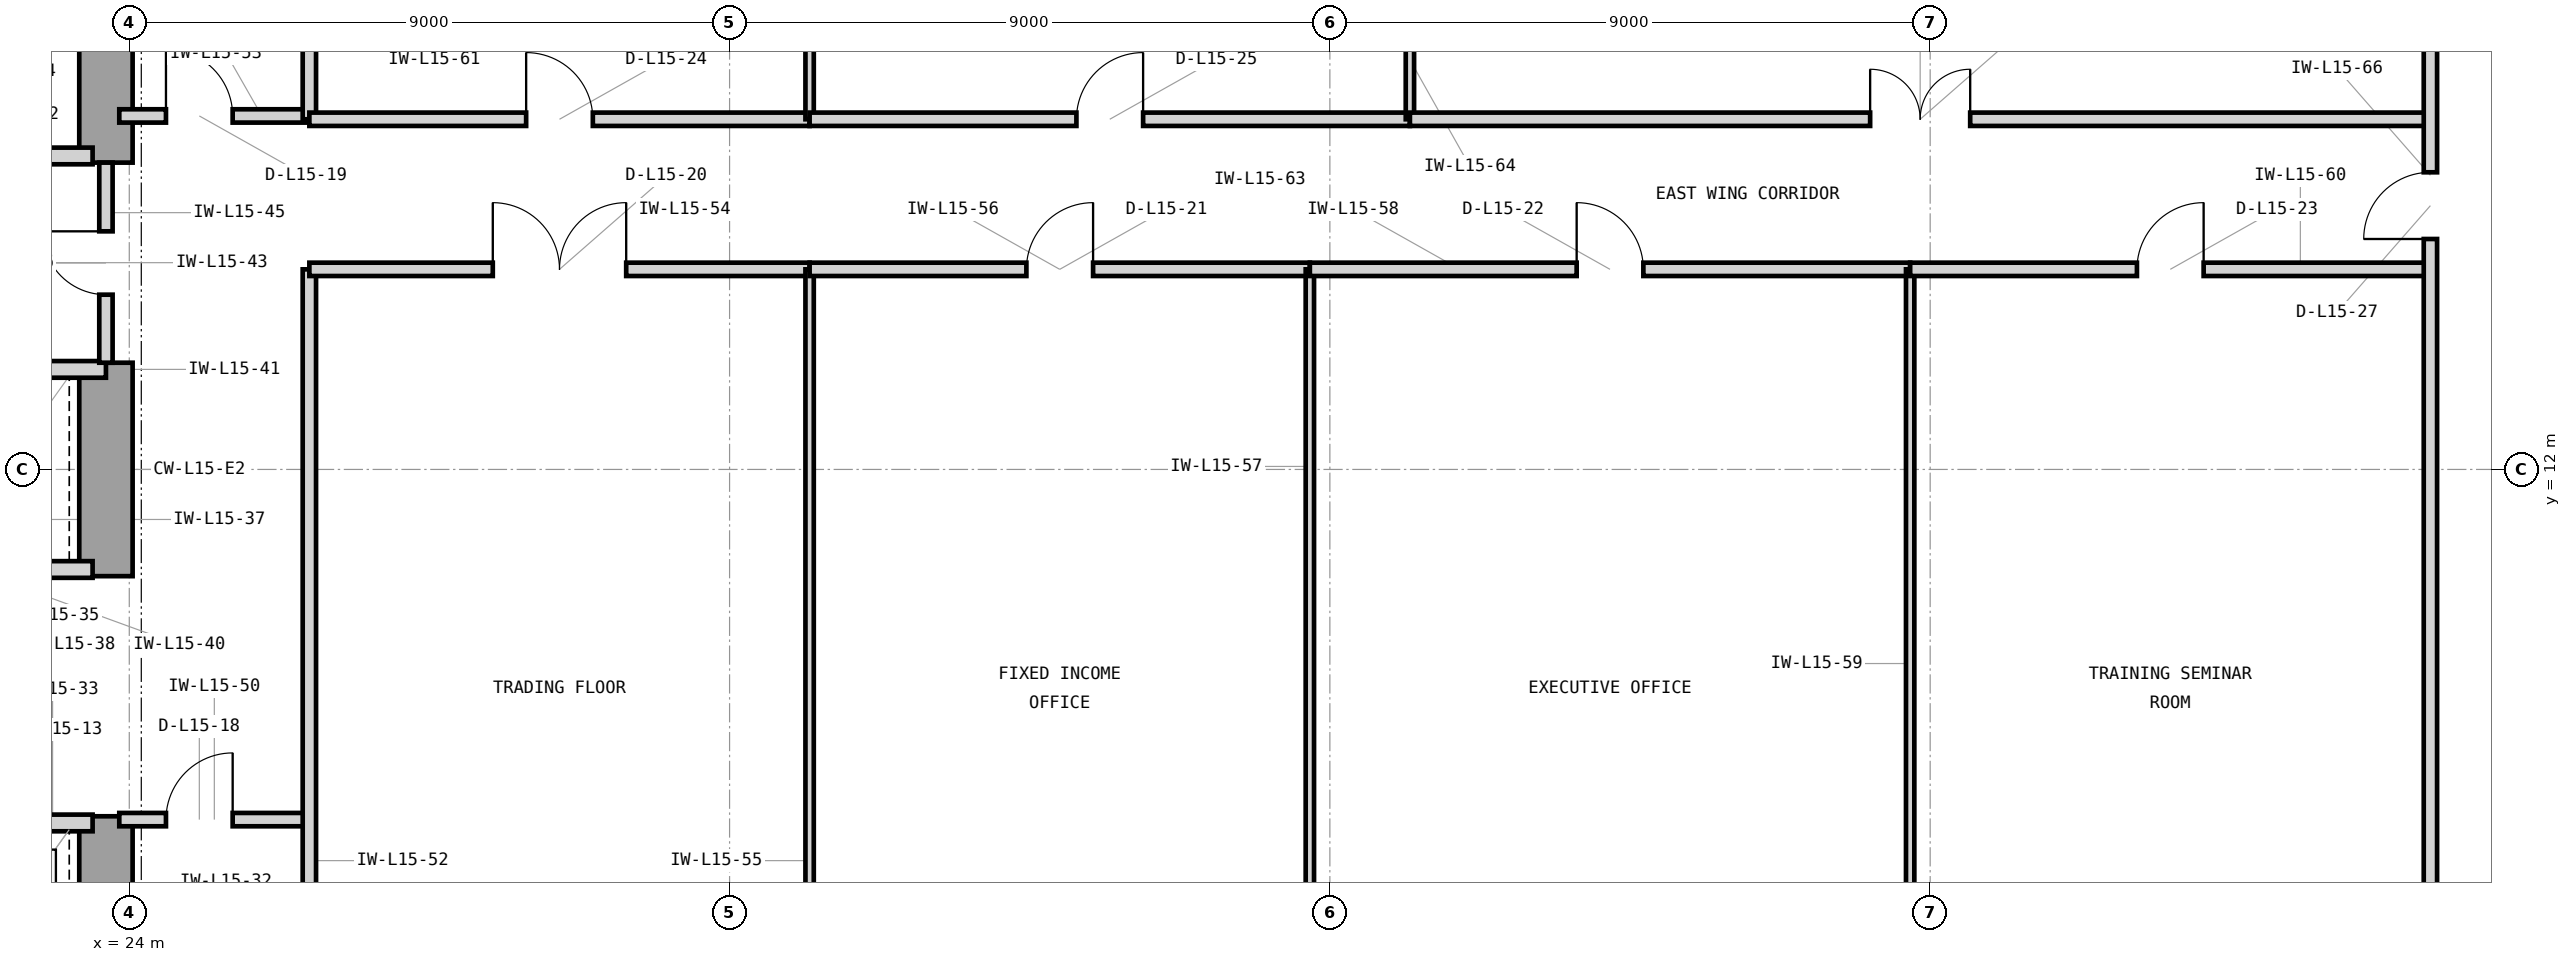
"""IFC4 building model, lengths in metres.
Left out: names, types, materials, properties, quantities, classifications, styles, units other than length and angle.
Written with IfcOpenShell. Run it as: python <this file> out.ifc"""

import sys

from ifc_helpers import new_model, si_unit, direction, frame, frame_2d, origin, place, context, subcontext, project, spatial, rectangle, extrude, element, fill, save


model = new_model("IFC4")
c1 = context("Model", 3, precision=1e-05, world=origin(), true_north=direction((0.0, 1.0)))
c2 = subcontext(c1, "Body", "Model", "MODEL_VIEW")
j1 = project(units=[si_unit("LENGTHUNIT", "METRE"), si_unit("PLANEANGLEUNIT", "RADIAN")], contexts=[c1])
p1 = place(None, origin())
s1 = spatial("IfcSite", under=j1, at=p1, CompositionType="ELEMENT")
p2 = place(p1, origin())
s2 = spatial("IfcBuilding", under=s1, at=p2, CompositionType="ELEMENT")
p3 = place(p2, frame((0.0, 0.0, 67.8)))
s3 = spatial("IfcBuildingStorey", under=s2, at=p3, CompositionType="ELEMENT", Elevation=67.8)
p4 = place(p3, frame((23.65, 3.75, 0.0), z_axis=(0.0, 0.0, 1.0), x_axis=(0.0, 1.0, 0.0)))
e1 = element("IfcWall", 1, at=p4, inside=s3, PredefinedType="SHEAR", context=c2, shape_type="SweptSolid", body=[
    extrude(rectangle(XDim=3.05, YDim=0.8, at=frame_2d((1.525, 0.0))), origin(), (0.0, 0.0, 1.0), 4.2),
])
p5 = place(p3, frame((23.65, 10.4, 0.0), z_axis=(0.0, 0.0, 1.0), x_axis=(0.0, 1.0, 0.0)))
e2 = element("IfcWall", 2, at=p5, inside=s3, PredefinedType="SHEAR", context=c2, shape_type="SweptSolid", body=[
    extrude(rectangle(XDim=3.2, YDim=0.8, at=frame_2d((1.6, 0.0))), origin(), (0.0, 0.0, 1.0), 4.2),
])
p6 = place(p3, frame((23.65, 16.6, 0.0), z_axis=(0.0, 0.0, 1.0), x_axis=(0.0, 1.0, 0.0)))
e3 = element("IfcWall", 3, at=p6, inside=s3, PredefinedType="SHEAR", context=c2, shape_type="SweptSolid", body=[
    extrude(rectangle(XDim=4.05, YDim=0.8, at=frame_2d((2.025, 0.0))), origin(), (0.0, 0.0, 1.0), 4.2),
])
p7 = place(p3, frame((21.05, 16.7, 0.0), z_axis=(0.0, 0.0, 1.0), x_axis=(1.0, 0.0, 0.0)))
e4 = element("IfcWall", 4, at=p7, inside=s3, PredefinedType="PARTITIONING", context=c2, shape_type="SweptSolid", body=[
    extrude(rectangle(XDim=2.4, YDim=0.25, at=frame_2d((1.2, 0.0))), origin(), (0.0, 0.0, 1.0), 3.426),
])
p8 = place(p3, frame((21.05, 6.7, 0.0), z_axis=(0.0, 0.0, 1.0), x_axis=(1.0, 0.0, 0.0)))
e5 = element("IfcWall", 5, at=p8, inside=s3, PredefinedType="PARTITIONING", context=c2, shape_type="SweptSolid", body=[
    extrude(rectangle(XDim=2.4, YDim=0.25, at=frame_2d((1.2, 0.0))), origin(), (0.0, 0.0, 1.0), 3.426),
])
p9 = place(p8, frame((0.48, 0.0, 0.0)))
e6 = element("IfcOpeningElement", 6, at=p9, cuts=e5, PredefinedType="OPENING", context=c2, shape_type="SweptSolid", body=[
    extrude(rectangle(XDim=1.15, YDim=2.25, at=frame_2d((0.575, 1.125))), frame((0.0, 0.135, 0.0), z_axis=(0.0, -1.0, 0.0), x_axis=(1.0, 0.0, 0.0)), (0.0, 0.0, 1.0), 0.27),
])
p10 = place(p3, frame((21.05, 10.5, 0.0), z_axis=(0.0, 0.0, 1.0), x_axis=(1.0, 0.0, 0.0)))
e7 = element("IfcWall", 7, at=p10, inside=s3, PredefinedType="PARTITIONING", context=c2, shape_type="SweptSolid", body=[
    extrude(rectangle(XDim=2.4, YDim=0.25, at=frame_2d((1.2, 0.0))), origin(), (0.0, 0.0, 1.0), 3.426),
])
p11 = place(p3, frame((14.7, 13.5, 0.0), z_axis=(0.0, 0.0, 1.0), x_axis=(1.0, 0.0, 0.0)))
e8 = element("IfcWall", 8, at=p11, inside=s3, PredefinedType="PARTITIONING", context=c2, shape_type="SweptSolid", body=[
    extrude(rectangle(XDim=8.95, YDim=0.25, at=frame_2d((4.475, 0.0))), origin(), (0.0, 0.0, 1.0), 3.426),
])
p12 = place(p3, frame((23.65, 13.6, 0.0), z_axis=(0.0, 0.0, 1.0), x_axis=(0.0, 1.0, 0.0)))
e9 = element("IfcWall", 9, at=p12, inside=s3, PredefinedType="PARTITIONING", context=c2, shape_type="SweptSolid", body=[
    extrude(rectangle(XDim=3.0, YDim=0.2, at=frame_2d((1.5, 0.0))), origin(), (0.0, 0.0, 1.0), 3.97),
])
p13 = place(p12, frame((1.02, 0.0, 0.0)))
e10 = element("IfcOpeningElement", 10, at=p13, cuts=e9, PredefinedType="OPENING", context=c2, shape_type="SweptSolid", body=[
    extrude(rectangle(XDim=0.95, YDim=2.1, at=frame_2d((0.475, 1.05))), frame((0.0, 0.11, 0.0), z_axis=(0.0, -1.0, 0.0), x_axis=(1.0, 0.0, 0.0)), (0.0, 0.0, 1.0), 0.22),
])
p14 = place(p3, frame((23.85, 6.75, 0.0), z_axis=(0.0, 0.0, 1.0), x_axis=(1.0, 0.0, 0.0)))
e11 = element("IfcWall", 11, at=p14, inside=s3, PredefinedType="PARTITIONING", context=c2, shape_type="SweptSolid", body=[
    extrude(rectangle(XDim=2.85, YDim=0.2, at=frame_2d((1.425, 0.0))), origin(), (0.0, 0.0, 1.0), 3.97),
])
p15 = place(p14, frame((0.7, 0.0, 0.0)))
e12 = element("IfcOpeningElement", 12, at=p15, cuts=e11, PredefinedType="OPENING", context=c2, shape_type="SweptSolid", body=[
    extrude(rectangle(XDim=1.0, YDim=2.15, at=frame_2d((0.5, 1.075))), frame((0.0, 0.11, 0.0), z_axis=(0.0, -1.0, 0.0), x_axis=(1.0, 0.0, 0.0)), (0.0, 0.0, 1.0), 0.22),
])
p16 = place(p3, frame((23.85, 17.3, 0.0), z_axis=(0.0, 0.0, 1.0), x_axis=(1.0, 0.0, 0.0)))
e13 = element("IfcWall", 13, at=p16, inside=s3, PredefinedType="PARTITIONING", context=c2, shape_type="SweptSolid", body=[
    extrude(rectangle(XDim=2.85, YDim=0.2, at=frame_2d((1.425, 0.0))), origin(), (0.0, 0.0, 1.0), 3.97),
])
p17 = place(p16, frame((0.7, 0.0, 0.0)))
e14 = element("IfcOpeningElement", 14, at=p17, cuts=e13, PredefinedType="OPENING", context=c2, shape_type="SweptSolid", body=[
    extrude(rectangle(XDim=1.0, YDim=2.15, at=frame_2d((0.5, 1.075))), frame((0.0, 0.11, 0.0), z_axis=(0.0, -1.0, 0.0), x_axis=(1.0, 0.0, 0.0)), (0.0, 0.0, 1.0), 0.22),
])
p18 = place(p3, frame((26.7, 3.18, 0.0), z_axis=(0.0, 0.0, 1.0), x_axis=(0.0, 1.0, 0.0)))
e15 = element("IfcWall", 15, at=p18, inside=s3, PredefinedType="PARTITIONING", context=c2, shape_type="SweptSolid", body=[
    extrude(rectangle(XDim=11.82, YDim=0.2, at=frame_2d((5.91, 0.0))), origin(), (0.0, 0.0, 1.0), 3.97),
])
p19 = place(p3, frame((26.7, 17.25, 0.0), z_axis=(0.0, 0.0, 1.0), x_axis=(0.0, 1.0, 0.0)))
e16 = element("IfcWall", 16, at=p19, inside=s3, PredefinedType="PARTITIONING", context=c2, shape_type="SweptSolid", body=[
    extrude(rectangle(XDim=3.57, YDim=0.2, at=frame_2d((1.785, 0.0))), origin(), (0.0, 0.0, 1.0), 3.97),
])
p20 = place(p3, frame((26.7, 15.0, 0.0), z_axis=(0.0, 0.0, 1.0), x_axis=(1.0, 0.0, 0.0)))
e17 = element("IfcWall", 17, at=p20, inside=s3, PredefinedType="PARTITIONING", context=c2, shape_type="SweptSolid", body=[
    extrude(rectangle(XDim=7.5, YDim=0.2, at=frame_2d((3.75, 0.0))), origin(), (0.0, 0.0, 1.0), 3.426),
])
p21 = place(p20, frame((2.75, 0.0, 0.0)))
e18 = element("IfcOpeningElement", 18, at=p21, cuts=e17, PredefinedType="OPENING", context=c2, shape_type="SweptSolid", body=[
    extrude(rectangle(XDim=2.0, YDim=2.5, at=frame_2d((1.0, 1.25))), frame((0.0, 0.11, 0.0), z_axis=(0.0, -1.0, 0.0), x_axis=(1.0, 0.0, 0.0)), (0.0, 0.0, 1.0), 0.22),
])
p22 = place(p3, frame((34.2, 3.18, 0.0), z_axis=(0.0, 0.0, 1.0), x_axis=(0.0, 1.0, 0.0)))
e19 = element("IfcWall", 19, at=p22, inside=s3, PredefinedType="PARTITIONING", context=c2, shape_type="SweptSolid", body=[
    extrude(rectangle(XDim=11.82, YDim=0.125, at=frame_2d((5.91, 0.0))), origin(), (0.0, 0.0, 1.0), 3.97),
])
p23 = place(p3, frame((34.2, 15.0, 0.0), z_axis=(0.0, 0.0, 1.0), x_axis=(1.0, 0.0, 0.0)))
e20 = element("IfcWall", 20, at=p23, inside=s3, PredefinedType="PARTITIONING", context=c2, shape_type="SweptSolid", body=[
    extrude(rectangle(XDim=7.5, YDim=0.2, at=frame_2d((3.75, 0.0))), origin(), (0.0, 0.0, 1.0), 3.426),
])
p24 = place(p23, frame((3.25, 0.0, 0.0)))
e21 = element("IfcOpeningElement", 21, at=p24, cuts=e20, PredefinedType="OPENING", context=c2, shape_type="SweptSolid", body=[
    extrude(rectangle(XDim=1.0, YDim=2.15, at=frame_2d((0.5, 1.075))), frame((0.0, 0.11, 0.0), z_axis=(0.0, -1.0, 0.0), x_axis=(1.0, 0.0, 0.0)), (0.0, 0.0, 1.0), 0.22),
])
p25 = place(p3, frame((41.7, 3.18, 0.0), z_axis=(0.0, 0.0, 1.0), x_axis=(0.0, 1.0, 0.0)))
e22 = element("IfcWall", 22, at=p25, inside=s3, PredefinedType="PARTITIONING", context=c2, shape_type="SweptSolid", body=[
    extrude(rectangle(XDim=11.82, YDim=0.125, at=frame_2d((5.91, 0.0))), origin(), (0.0, 0.0, 1.0), 3.97),
])
p26 = place(p3, frame((41.7, 15.0, 0.0), z_axis=(0.0, 0.0, 1.0), x_axis=(1.0, 0.0, 0.0)))
e23 = element("IfcWall", 23, at=p26, inside=s3, PredefinedType="PARTITIONING", context=c2, shape_type="SweptSolid", body=[
    extrude(rectangle(XDim=9.0, YDim=0.2, at=frame_2d((4.5, 0.0))), origin(), (0.0, 0.0, 1.0), 3.426),
])
p27 = place(p26, frame((4.0, 0.0, 0.0)))
e24 = element("IfcOpeningElement", 24, at=p27, cuts=e23, PredefinedType="OPENING", context=c2, shape_type="SweptSolid", body=[
    extrude(rectangle(XDim=1.0, YDim=2.15, at=frame_2d((0.5, 1.075))), frame((0.0, 0.11, 0.0), z_axis=(0.0, -1.0, 0.0), x_axis=(1.0, 0.0, 0.0)), (0.0, 0.0, 1.0), 0.22),
])
p28 = place(p3, frame((50.7, 3.18, 0.0), z_axis=(0.0, 0.0, 1.0), x_axis=(0.0, 1.0, 0.0)))
e25 = element("IfcWall", 25, at=p28, inside=s3, PredefinedType="PARTITIONING", context=c2, shape_type="SweptSolid", body=[
    extrude(rectangle(XDim=11.82, YDim=0.125, at=frame_2d((5.91, 0.0))), origin(), (0.0, 0.0, 1.0), 3.97),
])
p29 = place(p3, frame((50.7, 15.0, 0.0), z_axis=(0.0, 0.0, 1.0), x_axis=(1.0, 0.0, 0.0)))
e26 = element("IfcWall", 26, at=p29, inside=s3, PredefinedType="PARTITIONING", context=c2, shape_type="SweptSolid", body=[
    extrude(rectangle(XDim=7.8, YDim=0.2, at=frame_2d((3.9, 0.0))), origin(), (0.0, 0.0, 1.0), 3.426),
])
p30 = place(p29, frame((3.4, 0.0, 0.0)))
e27 = element("IfcOpeningElement", 27, at=p30, cuts=e26, PredefinedType="OPENING", context=c2, shape_type="SweptSolid", body=[
    extrude(rectangle(XDim=1.0, YDim=2.15, at=frame_2d((0.5, 1.075))), frame((0.0, 0.11, 0.0), z_axis=(0.0, -1.0, 0.0), x_axis=(1.0, 0.0, 0.0)), (0.0, 0.0, 1.0), 0.22),
])
p31 = place(p3, frame((26.7, 17.25, 0.0), z_axis=(0.0, 0.0, 1.0), x_axis=(1.0, 0.0, 0.0)))
e28 = element("IfcWall", 28, at=p31, inside=s3, PredefinedType="PARTITIONING", context=c2, shape_type="SweptSolid", body=[
    extrude(rectangle(XDim=7.5, YDim=0.2, at=frame_2d((3.75, 0.0))), origin(), (0.0, 0.0, 1.0), 3.97),
])
p32 = place(p31, frame((3.25, 0.0, 0.0)))
e29 = element("IfcOpeningElement", 29, at=p32, cuts=e28, PredefinedType="OPENING", context=c2, shape_type="SweptSolid", body=[
    extrude(rectangle(XDim=1.0, YDim=2.15, at=frame_2d((0.5, 1.075))), frame((0.0, 0.11, 0.0), z_axis=(0.0, -1.0, 0.0), x_axis=(1.0, 0.0, 0.0)), (0.0, 0.0, 1.0), 0.22),
])
p33 = place(p3, frame((34.2, 17.25, 0.0), z_axis=(0.0, 0.0, 1.0), x_axis=(0.0, 1.0, 0.0)))
e30 = element("IfcWall", 30, at=p33, inside=s3, PredefinedType="PARTITIONING", context=c2, shape_type="SweptSolid", body=[
    extrude(rectangle(XDim=3.57, YDim=0.125, at=frame_2d((1.785, 0.0))), origin(), (0.0, 0.0, 1.0), 3.97),
])
p34 = place(p3, frame((34.2, 17.25, 0.0), z_axis=(0.0, 0.0, 1.0), x_axis=(1.0, 0.0, 0.0)))
e31 = element("IfcWall", 31, at=p34, inside=s3, PredefinedType="PARTITIONING", context=c2, shape_type="SweptSolid", body=[
    extrude(rectangle(XDim=9.0, YDim=0.2, at=frame_2d((4.5, 0.0))), origin(), (0.0, 0.0, 1.0), 3.97),
])
p35 = place(p34, frame((4.0, 0.0, 0.0)))
e32 = element("IfcOpeningElement", 32, at=p35, cuts=e31, PredefinedType="OPENING", context=c2, shape_type="SweptSolid", body=[
    extrude(rectangle(XDim=1.0, YDim=2.15, at=frame_2d((0.5, 1.075))), frame((0.0, 0.11, 0.0), z_axis=(0.0, -1.0, 0.0), x_axis=(1.0, 0.0, 0.0)), (0.0, 0.0, 1.0), 0.22),
])
p36 = place(p3, frame((43.2, 17.25, 0.0), z_axis=(0.0, 0.0, 1.0), x_axis=(0.0, 1.0, 0.0)))
e33 = element("IfcWall", 33, at=p36, inside=s3, PredefinedType="PARTITIONING", context=c2, shape_type="SweptSolid", body=[
    extrude(rectangle(XDim=3.57, YDim=0.125, at=frame_2d((1.785, 0.0))), origin(), (0.0, 0.0, 1.0), 3.97),
])
p37 = place(p3, frame((43.2, 17.25, 0.0), z_axis=(0.0, 0.0, 1.0), x_axis=(1.0, 0.0, 0.0)))
e34 = element("IfcWall", 34, at=p37, inside=s3, PredefinedType="PARTITIONING", context=c2, shape_type="SweptSolid", body=[
    extrude(rectangle(XDim=15.3, YDim=0.2, at=frame_2d((7.65, 0.0))), origin(), (0.0, 0.0, 1.0), 3.97),
])
p38 = place(p37, frame((6.9, 0.0, 0.0)))
e35 = element("IfcOpeningElement", 35, at=p38, cuts=e34, PredefinedType="OPENING", context=c2, shape_type="SweptSolid", body=[
    extrude(rectangle(XDim=1.5, YDim=2.3, at=frame_2d((0.75, 1.15))), frame((0.0, 0.11, 0.0), z_axis=(0.0, -1.0, 0.0), x_axis=(1.0, 0.0, 0.0)), (0.0, 0.0, 1.0), 0.22),
])
p39 = place(p3, frame((58.5, 3.18, 0.0), z_axis=(0.0, 0.0, 1.0), x_axis=(0.0, 1.0, 0.0)))
e36 = element("IfcWall", 36, at=p39, inside=s3, PredefinedType="PARTITIONING", context=c2, shape_type="SweptSolid", body=[
    extrude(rectangle(XDim=17.64, YDim=0.2, at=frame_2d((8.82, 0.0))), origin(), (0.0, 0.0, 1.0), 3.97),
])
p40 = place(p39, frame((12.275, 0.0, 0.0)))
e37 = element("IfcOpeningElement", 37, at=p40, cuts=e36, PredefinedType="OPENING", context=c2, shape_type="SweptSolid", body=[
    extrude(rectangle(XDim=1.0, YDim=2.15, at=frame_2d((0.5, 1.075))), frame((0.0, 0.11, 0.0), z_axis=(0.0, -1.0, 0.0), x_axis=(1.0, 0.0, 0.0)), (0.0, 0.0, 1.0), 0.22),
])
p41 = place(p13, origin())
e38 = element("IfcDoor", 38, at=p41, inside=s3, OperationType="SINGLE_SWING_RIGHT", PredefinedType="DOOR", context=c2, shape_type="SweptSolid", body=[
    extrude(rectangle(XDim=0.95, YDim=2.1, at=frame_2d((0.475, 1.05))), frame((0.0, 0.025, 0.0), z_axis=(0.0, -1.0, 0.0), x_axis=(1.0, 0.0, 0.0)), (0.0, 0.0, 1.0), 0.05),
])
fill(e10, e38)
p42 = place(p15, origin())
e39 = element("IfcDoor", 39, at=p42, inside=s3, OperationType="SINGLE_SWING_RIGHT", PredefinedType="DOOR", context=c2, shape_type="SweptSolid", body=[
    extrude(rectangle(XDim=1.0, YDim=2.15, at=frame_2d((0.5, 1.075))), frame((0.0, 0.025, 0.0), z_axis=(0.0, -1.0, 0.0), x_axis=(1.0, 0.0, 0.0)), (0.0, 0.0, 1.0), 0.05),
])
fill(e12, e39)
p43 = place(p17, origin())
e40 = element("IfcDoor", 40, at=p43, inside=s3, OperationType="SINGLE_SWING_LEFT", PredefinedType="DOOR", context=c2, shape_type="SweptSolid", body=[
    extrude(rectangle(XDim=1.0, YDim=2.15, at=frame_2d((0.5, 1.075))), frame((0.0, 0.025, 0.0), z_axis=(0.0, -1.0, 0.0), x_axis=(1.0, 0.0, 0.0)), (0.0, 0.0, 1.0), 0.05),
])
fill(e14, e40)
p44 = place(p21, origin())
e41 = element("IfcDoor", 41, at=p44, inside=s3, OperationType="DOUBLE_DOOR_SINGLE_SWING", PredefinedType="DOOR", context=c2, shape_type="SweptSolid", body=[
    extrude(rectangle(XDim=2.0, YDim=2.5, at=frame_2d((1.0, 1.25))), frame((0.0, 0.025, 0.0), z_axis=(0.0, -1.0, 0.0), x_axis=(1.0, 0.0, 0.0)), (0.0, 0.0, 1.0), 0.05),
])
fill(e18, e41)
p45 = place(p24, origin())
e42 = element("IfcDoor", 42, at=p45, inside=s3, OperationType="SINGLE_SWING_RIGHT", PredefinedType="DOOR", context=c2, shape_type="SweptSolid", body=[
    extrude(rectangle(XDim=1.0, YDim=2.15, at=frame_2d((0.5, 1.075))), frame((0.0, 0.025, 0.0), z_axis=(0.0, -1.0, 0.0), x_axis=(1.0, 0.0, 0.0)), (0.0, 0.0, 1.0), 0.05),
])
fill(e21, e42)
p46 = place(p27, origin())
e43 = element("IfcDoor", 43, at=p46, inside=s3, OperationType="SINGLE_SWING_LEFT", PredefinedType="DOOR", context=c2, shape_type="SweptSolid", body=[
    extrude(rectangle(XDim=1.0, YDim=2.15, at=frame_2d((0.5, 1.075))), frame((0.0, 0.025, 0.0), z_axis=(0.0, -1.0, 0.0), x_axis=(1.0, 0.0, 0.0)), (0.0, 0.0, 1.0), 0.05),
])
fill(e24, e43)
p47 = place(p30, origin())
e44 = element("IfcDoor", 44, at=p47, inside=s3, OperationType="SINGLE_SWING_RIGHT", PredefinedType="DOOR", context=c2, shape_type="SweptSolid", body=[
    extrude(rectangle(XDim=1.0, YDim=2.15, at=frame_2d((0.5, 1.075))), frame((0.0, 0.025, 0.0), z_axis=(0.0, -1.0, 0.0), x_axis=(1.0, 0.0, 0.0)), (0.0, 0.0, 1.0), 0.05),
])
fill(e27, e44)
p48 = place(p32, origin())
e45 = element("IfcDoor", 45, at=p48, inside=s3, OperationType="SINGLE_SWING_LEFT", PredefinedType="DOOR", context=c2, shape_type="SweptSolid", body=[
    extrude(rectangle(XDim=1.0, YDim=2.15, at=frame_2d((0.5, 1.075))), frame((0.0, 0.025, 0.0), z_axis=(0.0, -1.0, 0.0), x_axis=(1.0, 0.0, 0.0)), (0.0, 0.0, 1.0), 0.05),
])
fill(e29, e45)
p49 = place(p35, origin())
e46 = element("IfcDoor", 46, at=p49, inside=s3, OperationType="SINGLE_SWING_RIGHT", PredefinedType="DOOR", context=c2, shape_type="SweptSolid", body=[
    extrude(rectangle(XDim=1.0, YDim=2.15, at=frame_2d((0.5, 1.075))), frame((0.0, 0.025, 0.0), z_axis=(0.0, -1.0, 0.0), x_axis=(1.0, 0.0, 0.0)), (0.0, 0.0, 1.0), 0.05),
])
fill(e32, e46)
p50 = place(p38, origin())
e47 = element("IfcDoor", 47, at=p50, inside=s3, OperationType="DOUBLE_DOOR_SINGLE_SWING", PredefinedType="DOOR", context=c2, shape_type="SweptSolid", body=[
    extrude(rectangle(XDim=1.5, YDim=2.3, at=frame_2d((0.75, 1.15))), frame((0.0, 0.025, 0.0), z_axis=(0.0, -1.0, 0.0), x_axis=(1.0, 0.0, 0.0)), (0.0, 0.0, 1.0), 0.05),
])
fill(e35, e47)
p51 = place(p40, origin())
e48 = element("IfcDoor", 48, at=p51, inside=s3, OperationType="SINGLE_SWING_LEFT", PredefinedType="DOOR", context=c2, shape_type="SweptSolid", body=[
    extrude(rectangle(XDim=1.0, YDim=2.15, at=frame_2d((0.5, 1.075))), frame((0.0, 0.025, 0.0), z_axis=(0.0, -1.0, 0.0), x_axis=(1.0, 0.0, 0.0)), (0.0, 0.0, 1.0), 0.05),
])
fill(e37, e48)
save(model, sys.argv[1])
